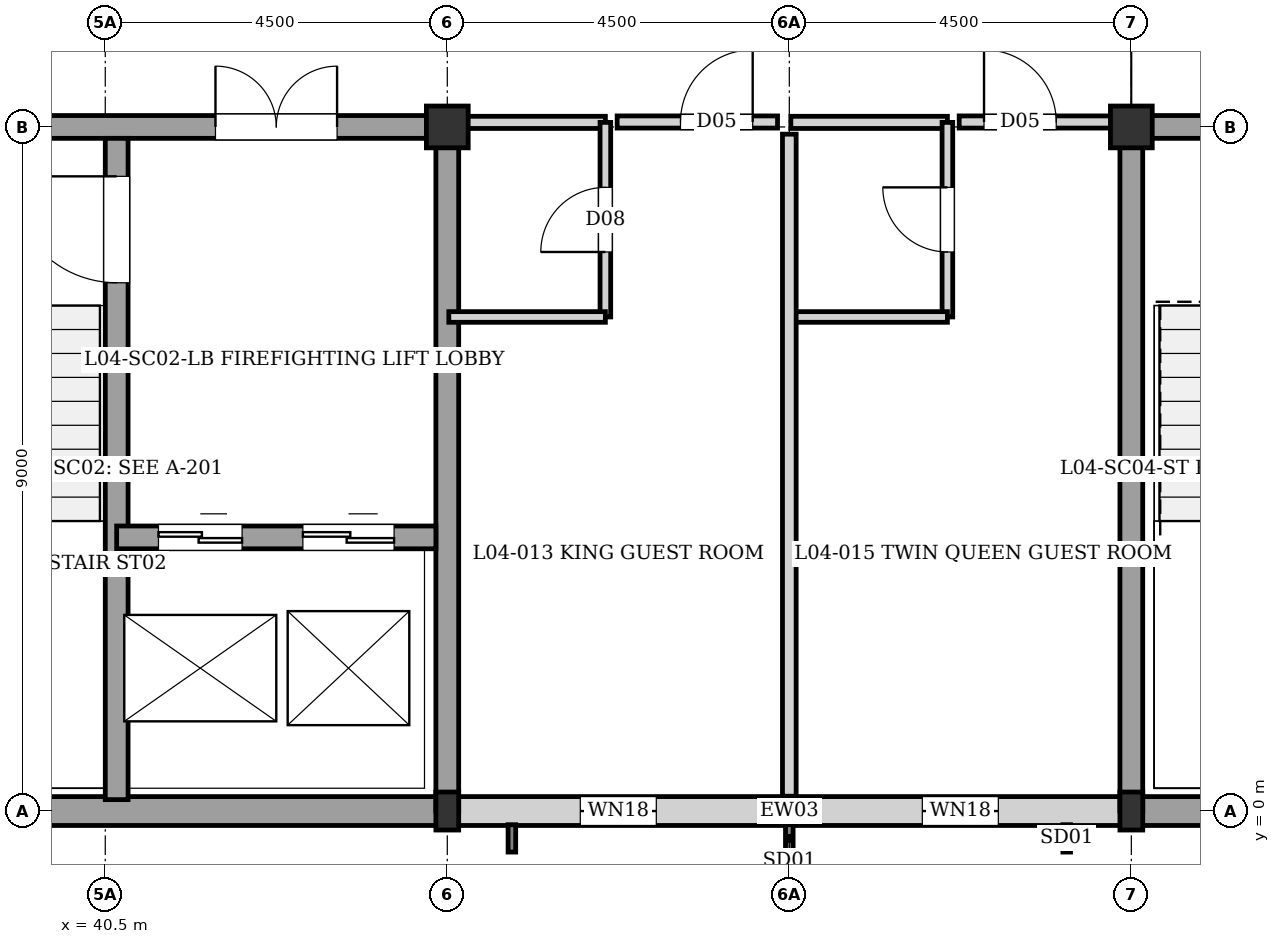
"""IFC4 building model, lengths in metres.
Left out: names, types, materials, properties, quantities, classifications, styles, units other than length and angle.
Written with IfcOpenShell. Run it as: python <this file> out.ifc"""

import sys

from ifc_helpers import new_model, si_unit, direction, frame, frame_2d, origin, origin_2d, place, context, subcontext, project, spatial, rectangle, i_section, extrude, element, fill, save


model = new_model("IFC4")
c1 = context("Model", 3, precision=1e-05, world=origin(), true_north=direction((0.0, 1.0)))
c2 = subcontext(c1, "Body", "Model", "MODEL_VIEW")
j1 = project(units=[si_unit("LENGTHUNIT", "METRE"), si_unit("PLANEANGLEUNIT", "RADIAN")], contexts=[c1])
p1 = place(None, origin())
s1 = spatial("IfcSite", under=j1, at=p1, CompositionType="ELEMENT")
p2 = place(p1, origin())
s2 = spatial("IfcBuilding", under=s1, at=p2, CompositionType="ELEMENT")
p3 = place(p2, frame((0.0, 0.0, 14.56)))
s3 = spatial("IfcBuildingStorey", under=s2, at=p3, CompositionType="ELEMENT", Elevation=14.56)
p4 = place(p3, frame((45.0, 0.0, 0.0), z_axis=(0.0, 0.0, 1.0), x_axis=(1.0, 0.0, 0.0)))
e1 = element("IfcColumn", 1, at=p4, inside=s3, PredefinedType="COLUMN", context=c2, shape_type="SweptSolid", body=[
    extrude(i_section(OverallWidth=0.3, OverallDepth=0.5, WebThickness=0.014, FlangeThickness=0.028, at=origin_2d()), origin(), (0.0, 0.0, 1.0), 3.04),
])
p5 = place(p3, frame((45.0, 9.0, 0.0), z_axis=(0.0, 0.0, 1.0), x_axis=(1.0, 0.0, 0.0)))
e2 = element("IfcColumn", 2, at=p5, inside=s3, PredefinedType="COLUMN", context=c2, shape_type="SweptSolid", body=[
    extrude(rectangle(XDim=0.55, YDim=0.55, at=origin_2d()), origin(), (0.0, 0.0, 1.0), 3.04),
])
p6 = place(p3, frame((54.0, 0.0, 0.0), z_axis=(0.0, 0.0, 1.0), x_axis=(1.0, 0.0, 0.0)))
e3 = element("IfcColumn", 3, at=p6, inside=s3, PredefinedType="COLUMN", context=c2, shape_type="SweptSolid", body=[
    extrude(i_section(OverallWidth=0.3, OverallDepth=0.5, WebThickness=0.014, FlangeThickness=0.028, at=origin_2d()), origin(), (0.0, 0.0, 1.0), 3.04),
])
p7 = place(p3, frame((54.0, 9.0, 0.0), z_axis=(0.0, 0.0, 1.0), x_axis=(1.0, 0.0, 0.0)))
e4 = element("IfcColumn", 4, at=p7, inside=s3, PredefinedType="COLUMN", context=c2, shape_type="SweptSolid", body=[
    extrude(rectangle(XDim=0.55, YDim=0.55, at=origin_2d()), origin(), (0.0, 0.0, 1.0), 3.04),
])
p8 = place(p3, frame((63.0, 0.0, 0.0), z_axis=(0.0, 0.0, 1.0), x_axis=(-1.0, 0.0, 0.0)))
e5 = element("IfcWall", 5, at=p8, inside=s3, PredefinedType="SOLIDWALL", context=c2, shape_type="SweptSolid", body=[
    extrude(rectangle(XDim=9.0, YDim=0.38, at=frame_2d((4.5, 0.0))), origin(), (0.0, 0.0, 1.0), 2.82),
])
p9 = place(p3, frame((53.87, 0.0, 0.0), z_axis=(0.0, 0.0, 1.0), x_axis=(-1.0, 0.0, 0.0)))
e6 = element("IfcWall", 6, at=p9, inside=s3, PredefinedType="SOLIDWALL", context=c2, shape_type="SweptSolid", body=[
    extrude(rectangle(XDim=8.74, YDim=0.38, at=frame_2d((4.37, 0.0))), origin(), (0.0, 0.0, 1.0), 2.38),
])
p10 = place(p9, frame((1.62, 0.0, 0.35)))
e7 = element("IfcOpeningElement", 7, at=p10, cuts=e6, PredefinedType="OPENING", context=c2, shape_type="SweptSolid", body=[
    extrude(rectangle(XDim=1.0, YDim=1.6, at=frame_2d((0.5, 0.8))), frame((0.0, 0.2, 0.0), z_axis=(0.0, -1.0, 0.0), x_axis=(1.0, 0.0, 0.0)), (0.0, 0.0, 1.0), 0.4),
])
p11 = place(p9, frame((6.12, 0.0, 0.35)))
e8 = element("IfcOpeningElement", 8, at=p11, cuts=e6, PredefinedType="OPENING", context=c2, shape_type="SweptSolid", body=[
    extrude(rectangle(XDim=1.0, YDim=1.6, at=frame_2d((0.5, 0.8))), frame((0.0, 0.2, 0.0), z_axis=(0.0, -1.0, 0.0), x_axis=(1.0, 0.0, 0.0)), (0.0, 0.0, 1.0), 0.4),
])
p12 = place(p3, frame((45.0, 0.0, 0.0), z_axis=(0.0, 0.0, 1.0), x_axis=(-1.0, 0.0, 0.0)))
e9 = element("IfcWall", 9, at=p12, inside=s3, PredefinedType="SOLIDWALL", context=c2, shape_type="SweptSolid", body=[
    extrude(rectangle(XDim=9.0, YDim=0.38, at=frame_2d((4.5, 0.0))), origin(), (0.0, 0.0, 1.0), 2.82),
])
p13 = place(p3, frame((45.0, 0.0, 0.0), z_axis=(0.0, 0.0, 1.0), x_axis=(0.0, 1.0, 0.0)))
e10 = element("IfcWall", 10, at=p13, inside=s3, PredefinedType="SHEAR", context=c2, shape_type="SweptSolid", body=[
    extrude(rectangle(XDim=9.0, YDim=0.3, at=frame_2d((4.5, 0.0))), origin(), (0.0, 0.0, 1.0), 2.82),
])
p14 = place(p3, frame((36.0, 9.0, 0.0), z_axis=(0.0, 0.0, 1.0), x_axis=(1.0, 0.0, 0.0)))
e11 = element("IfcWall", 11, at=p14, inside=s3, PredefinedType="SHEAR", context=c2, shape_type="SweptSolid", body=[
    extrude(rectangle(XDim=9.0, YDim=0.3, at=frame_2d((4.5, 0.0))), origin(), (0.0, 0.0, 1.0), 2.82),
])
p15 = place(p14, frame((5.95, 0.0, 0.0)))
e12 = element("IfcOpeningElement", 12, at=p15, cuts=e11, PredefinedType="OPENING", context=c2, shape_type="SweptSolid", body=[
    extrude(rectangle(XDim=1.6, YDim=2.1, at=frame_2d((0.8, 1.05))), frame((0.0, 0.16, 0.0), z_axis=(0.0, -1.0, 0.0), x_axis=(1.0, 0.0, 0.0)), (0.0, 0.0, 1.0), 0.32),
])
p16 = place(p3, frame((40.65, 0.15, 0.0), z_axis=(0.0, 0.0, 1.0), x_axis=(0.0, 1.0, 0.0)))
e13 = element("IfcWall", 13, at=p16, inside=s3, PredefinedType="SHEAR", context=c2, shape_type="SweptSolid", body=[
    extrude(rectangle(XDim=8.7, YDim=0.3, at=frame_2d((4.35, 0.0))), origin(), (0.0, 0.0, 1.0), 2.82),
])
p17 = place(p16, frame((6.8, 0.0, 0.0)))
e14 = element("IfcOpeningElement", 14, at=p17, cuts=e13, PredefinedType="OPENING", context=c2, shape_type="SweptSolid", body=[
    extrude(rectangle(XDim=1.4, YDim=2.02, at=frame_2d((0.7, 1.01))), frame((0.0, 0.16, 0.0), z_axis=(0.0, -1.0, 0.0), x_axis=(1.0, 0.0, 0.0)), (0.0, 0.0, 1.0), 0.32),
])
p18 = place(p3, frame((40.65, 3.6, 0.0), z_axis=(0.0, 0.0, 1.0), x_axis=(1.0, 0.0, 0.0)))
e15 = element("IfcWall", 15, at=p18, inside=s3, PredefinedType="SHEAR", context=c2, shape_type="SweptSolid", body=[
    extrude(rectangle(XDim=4.2, YDim=0.3, at=frame_2d((2.1, 0.0))), origin(), (0.0, 0.0, 1.0), 2.82),
])
p19 = place(p18, frame((0.55, 0.0, 0.0)))
e16 = element("IfcOpeningElement", 16, at=p19, cuts=e15, PredefinedType="OPENING", context=c2, shape_type="SweptSolid", body=[
    extrude(rectangle(XDim=1.1, YDim=2.1, at=frame_2d((0.55, 1.05))), frame((0.0, 0.16, 0.0), z_axis=(0.0, -1.0, 0.0), x_axis=(1.0, 0.0, 0.0)), (0.0, 0.0, 1.0), 0.32),
])
p20 = place(p18, frame((2.45, 0.0, 0.0)))
e17 = element("IfcOpeningElement", 17, at=p20, cuts=e15, PredefinedType="OPENING", context=c2, shape_type="SweptSolid", body=[
    extrude(rectangle(XDim=1.2, YDim=2.2, at=frame_2d((0.6, 1.1))), frame((0.0, 0.16, 0.0), z_axis=(0.0, -1.0, 0.0), x_axis=(1.0, 0.0, 0.0)), (0.0, 0.0, 1.0), 0.32),
])
p21 = place(p3, frame((54.0, 9.0, 0.0), z_axis=(0.0, 0.0, 1.0), x_axis=(1.0, 0.0, 0.0)))
e18 = element("IfcWall", 18, at=p21, inside=s3, PredefinedType="SHEAR", context=c2, shape_type="SweptSolid", body=[
    extrude(rectangle(XDim=9.0, YDim=0.3, at=frame_2d((4.5, 0.0))), origin(), (0.0, 0.0, 1.0), 2.82),
])
p22 = place(p21, frame((6.05, 0.0, 0.0)))
e19 = element("IfcOpeningElement", 19, at=p22, cuts=e18, PredefinedType="OPENING", context=c2, shape_type="SweptSolid", body=[
    extrude(rectangle(XDim=1.4, YDim=2.02, at=frame_2d((0.7, 1.01))), frame((0.0, 0.16, 0.0), z_axis=(0.0, -1.0, 0.0), x_axis=(1.0, 0.0, 0.0)), (0.0, 0.0, 1.0), 0.32),
])
p23 = place(p3, frame((54.0, 0.0, 0.0), z_axis=(0.0, 0.0, 1.0), x_axis=(0.0, 1.0, 0.0)))
e20 = element("IfcWall", 20, at=p23, inside=s3, PredefinedType="SHEAR", context=c2, shape_type="SweptSolid", body=[
    extrude(rectangle(XDim=9.0, YDim=0.3, at=frame_2d((4.5, 0.0))), origin(), (0.0, 0.0, 1.0), 2.82),
])
p24 = place(p3, frame((45.02, 9.06, 0.0), z_axis=(0.0, 0.0, 1.0), x_axis=(1.0, 0.0, 0.0)))
e21 = element("IfcWall", 21, at=p24, inside=s3, PredefinedType="PARTITIONING", context=c2, shape_type="SweptSolid", body=[
    extrude(rectangle(XDim=2.06, YDim=0.16, at=frame_2d((1.03, 0.0))), origin(), (0.0, 0.0, 1.0), 2.42),
])
p25 = place(p3, frame((47.08, 6.5, 0.0), z_axis=(0.0, 0.0, 1.0), x_axis=(0.0, 1.0, 0.0)))
e22 = element("IfcWall", 22, at=p25, inside=s3, PredefinedType="PLUMBINGWALL", context=c2, shape_type="SweptSolid", body=[
    extrude(rectangle(XDim=2.56, YDim=0.14, at=frame_2d((1.28, 0.0))), origin(), (0.0, 0.0, 1.0), 2.82),
])
p26 = place(p25, frame((0.855, 0.0, 0.0)))
e23 = element("IfcOpeningElement", 23, at=p26, cuts=e22, PredefinedType="OPENING", context=c2, shape_type="SweptSolid", body=[
    extrude(rectangle(XDim=0.85, YDim=2.04, at=frame_2d((0.425, 1.02))), frame((0.0, 0.08, 0.0), z_axis=(0.0, -1.0, 0.0), x_axis=(1.0, 0.0, 0.0)), (0.0, 0.0, 1.0), 0.16),
])
p27 = place(p3, frame((45.02, 6.5, 0.0), z_axis=(0.0, 0.0, 1.0), x_axis=(1.0, 0.0, 0.0)))
e24 = element("IfcWall", 24, at=p27, inside=s3, PredefinedType="PLUMBINGWALL", context=c2, shape_type="SweptSolid", body=[
    extrude(rectangle(XDim=2.06, YDim=0.14, at=frame_2d((1.03, 0.0))), origin(), (0.0, 0.0, 1.0), 2.82),
])
p28 = place(p3, frame((49.52, 9.06, 0.0), z_axis=(0.0, 0.0, 1.0), x_axis=(1.0, 0.0, 0.0)))
e25 = element("IfcWall", 25, at=p28, inside=s3, PredefinedType="PARTITIONING", context=c2, shape_type="SweptSolid", body=[
    extrude(rectangle(XDim=2.06, YDim=0.16, at=frame_2d((1.03, 0.0))), origin(), (0.0, 0.0, 1.0), 2.42),
])
p29 = place(p3, frame((51.58, 6.5, 0.0), z_axis=(0.0, 0.0, 1.0), x_axis=(0.0, 1.0, 0.0)))
e26 = element("IfcWall", 26, at=p29, inside=s3, PredefinedType="PLUMBINGWALL", context=c2, shape_type="SweptSolid", body=[
    extrude(rectangle(XDim=2.56, YDim=0.14, at=frame_2d((1.28, 0.0))), origin(), (0.0, 0.0, 1.0), 2.82),
])
p30 = place(p29, frame((0.855, 0.0, 0.0)))
e27 = element("IfcOpeningElement", 27, at=p30, cuts=e26, PredefinedType="OPENING", context=c2, shape_type="SweptSolid", body=[
    extrude(rectangle(XDim=0.85, YDim=2.04, at=frame_2d((0.425, 1.02))), frame((0.0, 0.08, 0.0), z_axis=(0.0, -1.0, 0.0), x_axis=(1.0, 0.0, 0.0)), (0.0, 0.0, 1.0), 0.16),
])
p31 = place(p3, frame((49.52, 6.5, 0.0), z_axis=(0.0, 0.0, 1.0), x_axis=(1.0, 0.0, 0.0)))
e28 = element("IfcWall", 28, at=p31, inside=s3, PredefinedType="PLUMBINGWALL", context=c2, shape_type="SweptSolid", body=[
    extrude(rectangle(XDim=2.06, YDim=0.14, at=frame_2d((1.03, 0.0))), origin(), (0.0, 0.0, 1.0), 2.82),
])
p32 = place(p3, frame((49.5, 0.195, 0.0), z_axis=(0.0, 0.0, 1.0), x_axis=(0.0, 1.0, 0.0)))
e29 = element("IfcWall", 29, at=p32, inside=s3, PredefinedType="PARTITIONING", context=c2, shape_type="SweptSolid", body=[
    extrude(rectangle(XDim=8.71, YDim=0.18, at=frame_2d((4.355, 0.0))), origin(), (0.0, 0.0, 1.0), 2.82),
])
p33 = place(p3, frame((47.235, 9.065, 0.0), z_axis=(0.0, 0.0, 1.0), x_axis=(1.0, 0.0, 0.0)))
e30 = element("IfcWall", 30, at=p33, inside=s3, PredefinedType="PARTITIONING", context=c2, shape_type="SweptSolid", body=[
    extrude(rectangle(XDim=2.11, YDim=0.16, at=frame_2d((1.055, 0.0))), origin(), (0.0, 0.0, 1.0), 2.42),
])
p34 = place(p33, frame((0.833, 0.0, 0.0)))
e31 = element("IfcOpeningElement", 31, at=p34, cuts=e30, PredefinedType="OPENING", context=c2, shape_type="SweptSolid", body=[
    extrude(rectangle(XDim=0.95, YDim=2.15, at=frame_2d((0.475, 1.075))), frame((0.0, 0.09, 0.0), z_axis=(0.0, -1.0, 0.0), x_axis=(1.0, 0.0, 0.0)), (0.0, 0.0, 1.0), 0.18),
])
p35 = place(p3, frame((51.735, 9.065, 0.0), z_axis=(0.0, 0.0, 1.0), x_axis=(1.0, 0.0, 0.0)))
e32 = element("IfcWall", 32, at=p35, inside=s3, PredefinedType="PARTITIONING", context=c2, shape_type="SweptSolid", body=[
    extrude(rectangle(XDim=2.11, YDim=0.16, at=frame_2d((1.055, 0.0))), origin(), (0.0, 0.0, 1.0), 2.42),
])
p36 = place(p35, frame((0.327, 0.0, 0.0)))
e33 = element("IfcOpeningElement", 33, at=p36, cuts=e32, PredefinedType="OPENING", context=c2, shape_type="SweptSolid", body=[
    extrude(rectangle(XDim=0.95, YDim=2.15, at=frame_2d((0.475, 1.075))), frame((0.0, 0.09, 0.0), z_axis=(0.0, -1.0, 0.0), x_axis=(1.0, 0.0, 0.0)), (0.0, 0.0, 1.0), 0.18),
])
p37 = place(p10, origin())
e34 = element("IfcWindow", 34, at=p37, inside=s3, PartitioningType="SINGLE_PANEL", PredefinedType="WINDOW", context=c2, shape_type="SweptSolid", body=[
    extrude(rectangle(XDim=1.0, YDim=1.6, at=frame_2d((0.5, 0.8))), frame((0.0, 0.03, 0.0), z_axis=(0.0, -1.0, 0.0), x_axis=(1.0, 0.0, 0.0)), (0.0, 0.0, 1.0), 0.06),
])
fill(e7, e34)
p38 = place(p11, origin())
e35 = element("IfcWindow", 35, at=p38, inside=s3, PartitioningType="SINGLE_PANEL", PredefinedType="WINDOW", context=c2, shape_type="SweptSolid", body=[
    extrude(rectangle(XDim=1.0, YDim=1.6, at=frame_2d((0.5, 0.8))), frame((0.0, 0.03, 0.0), z_axis=(0.0, -1.0, 0.0), x_axis=(1.0, 0.0, 0.0)), (0.0, 0.0, 1.0), 0.06),
])
fill(e8, e35)
p39 = place(p15, origin())
e36 = element("IfcDoor", 36, at=p39, inside=s3, OperationType="DOUBLE_DOOR_SINGLE_SWING", PredefinedType="DOOR", context=c2, shape_type="SweptSolid", body=[
    extrude(rectangle(XDim=1.6, YDim=2.1, at=frame_2d((0.8, 1.05))), frame((0.0, 0.025, 0.0), z_axis=(0.0, -1.0, 0.0), x_axis=(1.0, 0.0, 0.0)), (0.0, 0.0, 1.0), 0.05),
])
fill(e12, e36)
p40 = place(p17, origin())
e37 = element("IfcDoor", 37, at=p40, inside=s3, OperationType="SINGLE_SWING_RIGHT", PredefinedType="DOOR", context=c2, shape_type="SweptSolid", body=[
    extrude(rectangle(XDim=1.4, YDim=2.02, at=frame_2d((0.7, 1.01))), frame((0.0, 0.025, 0.0), z_axis=(0.0, -1.0, 0.0), x_axis=(1.0, 0.0, 0.0)), (0.0, 0.0, 1.0), 0.05),
])
fill(e14, e37)
p41 = place(p19, origin())
e38 = element("IfcDoor", 38, at=p41, inside=s3, OperationType="DOUBLE_DOOR_SLIDING", PredefinedType="DOOR", context=c2, shape_type="SweptSolid", body=[
    extrude(rectangle(XDim=1.1, YDim=2.1, at=frame_2d((0.55, 1.05))), frame((0.0, 0.025, 0.0), z_axis=(0.0, -1.0, 0.0), x_axis=(1.0, 0.0, 0.0)), (0.0, 0.0, 1.0), 0.05),
])
fill(e16, e38)
p42 = place(p20, origin())
e39 = element("IfcDoor", 39, at=p42, inside=s3, OperationType="DOUBLE_DOOR_SLIDING", PredefinedType="DOOR", context=c2, shape_type="SweptSolid", body=[
    extrude(rectangle(XDim=1.2, YDim=2.2, at=frame_2d((0.6, 1.1))), frame((0.0, 0.025, 0.0), z_axis=(0.0, -1.0, 0.0), x_axis=(1.0, 0.0, 0.0)), (0.0, 0.0, 1.0), 0.05),
])
fill(e17, e39)
p43 = place(p26, origin())
e40 = element("IfcDoor", 40, at=p43, inside=s3, OperationType="SINGLE_SWING_LEFT", PredefinedType="DOOR", context=c2, shape_type="SweptSolid", body=[
    extrude(rectangle(XDim=0.85, YDim=2.04, at=frame_2d((0.425, 1.02))), frame((0.0, 0.025, 0.0), z_axis=(0.0, -1.0, 0.0), x_axis=(1.0, 0.0, 0.0)), (0.0, 0.0, 1.0), 0.05),
])
fill(e23, e40)
p44 = place(p30, origin())
e41 = element("IfcDoor", 41, at=p44, inside=s3, OperationType="SINGLE_SWING_RIGHT", PredefinedType="DOOR", context=c2, shape_type="SweptSolid", body=[
    extrude(rectangle(XDim=0.85, YDim=2.04, at=frame_2d((0.425, 1.02))), frame((0.0, 0.025, 0.0), z_axis=(0.0, -1.0, 0.0), x_axis=(1.0, 0.0, 0.0)), (0.0, 0.0, 1.0), 0.05),
])
fill(e27, e41)
p45 = place(p34, origin())
e42 = element("IfcDoor", 42, at=p45, inside=s3, OperationType="SINGLE_SWING_RIGHT", PredefinedType="DOOR", context=c2, shape_type="SweptSolid", body=[
    extrude(rectangle(XDim=0.95, YDim=2.15, at=frame_2d((0.475, 1.075))), frame((0.0, 0.025, 0.0), z_axis=(0.0, -1.0, 0.0), x_axis=(1.0, 0.0, 0.0)), (0.0, 0.0, 1.0), 0.05),
])
fill(e31, e42)
p46 = place(p36, origin())
e43 = element("IfcDoor", 43, at=p46, inside=s3, OperationType="SINGLE_SWING_LEFT", PredefinedType="DOOR", context=c2, shape_type="SweptSolid", body=[
    extrude(rectangle(XDim=0.95, YDim=2.15, at=frame_2d((0.475, 1.075))), frame((0.0, 0.025, 0.0), z_axis=(0.0, -1.0, 0.0), x_axis=(1.0, 0.0, 0.0)), (0.0, 0.0, 1.0), 0.05),
])
fill(e33, e43)
save(model, sys.argv[1])
